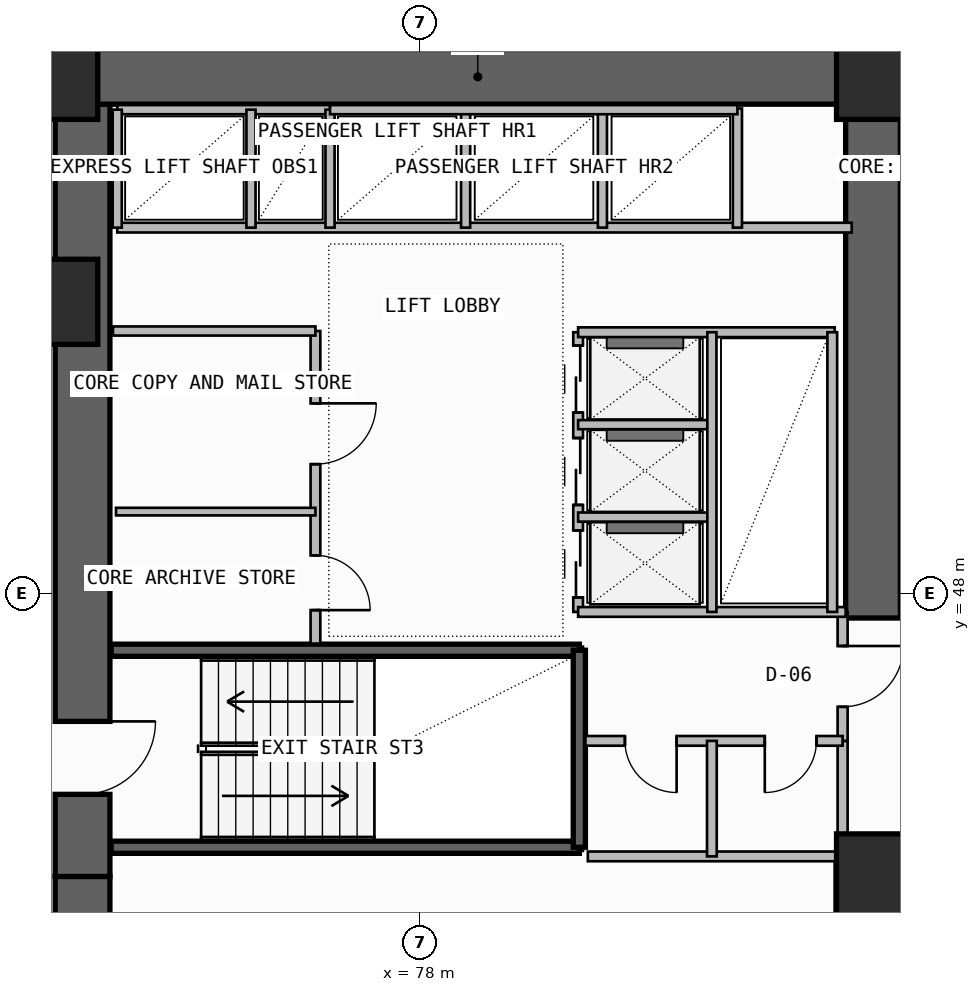
"""IFC4 building model, lengths in metres.
Left out: names, types, materials, properties, quantities, classifications, styles, units other than length and angle.
Written with IfcOpenShell. Run it as: python <this file> out.ifc"""

import sys

from ifc_helpers import new_model, si_unit, direction, frame, frame_2d, origin, origin_2d, place, context, subcontext, project, spatial, rectangle, extrude, element, fill, save


model = new_model("IFC4")
c1 = context("Model", 3, precision=1e-05, world=origin(), true_north=direction((0.0, 1.0)))
c2 = subcontext(c1, "Body", "Model", "MODEL_VIEW")
j1 = project(units=[si_unit("LENGTHUNIT", "METRE"), si_unit("PLANEANGLEUNIT", "RADIAN")], contexts=[c1])
p1 = place(None, origin())
s1 = spatial("IfcSite", under=j1, at=p1, CompositionType="ELEMENT")
p2 = place(p1, origin())
s2 = spatial("IfcBuilding", under=s1, at=p2, CompositionType="ELEMENT")
p3 = place(p2, frame((0.0, 0.0, 153.9)))
s3 = spatial("IfcBuildingStorey", under=s2, at=p3, CompositionType="ELEMENT", Elevation=153.9)
p4 = place(p3, frame((72.45, 35.5, -0.26), z_axis=(0.0, 0.0, 1.0), x_axis=(0.0, 1.0, 0.0)))
e1 = element("IfcWall", 1, at=p4, inside=s3, PredefinedType="SHEAR", context=c2, shape_type="SweptSolid", body=[
    extrude(rectangle(XDim=7.85, YDim=0.9, at=frame_2d((3.925, 0.0))), origin(), (0.0, 0.0, 1.0), 3.6),
])
p5 = place(p4, frame((1.45, 0.0, 0.26)))
e2 = element("IfcOpeningElement", 2, at=p5, cuts=e1, PredefinedType="OPENING", context=c2, shape_type="SweptSolid", body=[
    extrude(rectangle(XDim=1.2, YDim=2.2, at=frame_2d((0.6, 1.1))), frame((0.0, 0.46, 0.0), z_axis=(0.0, -1.0, 0.0), x_axis=(1.0, 0.0, 0.0)), (0.0, 0.0, 1.0), 0.92),
])
p6 = place(p3, frame((72.45, 43.35, -0.26), z_axis=(0.0, 0.0, 1.0), x_axis=(0.0, 1.0, 0.0)))
e3 = element("IfcWall", 3, at=p6, inside=s3, PredefinedType="SHEAR", context=c2, shape_type="SweptSolid", body=[
    extrude(rectangle(XDim=12.7, YDim=0.9, at=frame_2d((6.35, 0.0))), origin(), (0.0, 0.0, 1.0), 3.6),
])
p7 = place(p6, frame((1.35, 0.0, 0.26)))
e4 = element("IfcOpeningElement", 4, at=p7, cuts=e3, PredefinedType="OPENING", context=c2, shape_type="SweptSolid", body=[
    extrude(rectangle(XDim=1.2, YDim=2.2, at=frame_2d((0.6, 1.1))), frame((0.0, 0.46, 0.0), z_axis=(0.0, -1.0, 0.0), x_axis=(1.0, 0.0, 0.0)), (0.0, 0.0, 1.0), 0.92),
])
p8 = place(p3, frame((72.0, 56.5, -0.26), z_axis=(0.0, 0.0, 1.0), x_axis=(1.0, 0.0, 0.0)))
e5 = element("IfcWall", 5, at=p8, inside=s3, PredefinedType="SHEAR", context=c2, shape_type="SweptSolid", body=[
    extrude(rectangle(XDim=13.9, YDim=0.9, at=frame_2d((6.95, 0.0))), origin(), (0.0, 0.0, 1.0), 3.6),
])
p9 = place(p3, frame((85.45, 47.6, -0.26), z_axis=(0.0, 0.0, 1.0), x_axis=(0.0, 1.0, 0.0)))
e6 = element("IfcWall", 6, at=p9, inside=s3, PredefinedType="SHEAR", context=c2, shape_type="SweptSolid", body=[
    extrude(rectangle(XDim=8.45, YDim=0.9, at=frame_2d((4.225, 0.0))), origin(), (0.0, 0.0, 1.0), 3.6),
])
for number, where, z_axis, x_axis in (
    (7, (85.55, 43.35, 0.0), (0.0, 0.0, 1.0), (1.0, 0.0, 0.0)),
    (8, (72.0, 52.8, 0.0), (0.0, 0.0, 1.0), (1.0, 0.0, 0.0)),
    (9, (72.0, 56.5, 0.0), (0.0, 0.0, 1.0), (1.0, 0.0, 0.0)),
    (10, (85.55, 56.5, 0.0), (0.0, 0.0, 1.0), (1.0, 0.0, 0.0)),
):
    element("IfcColumn", number, at=place(p3, frame(where, z_axis=z_axis, x_axis=x_axis)), inside=s3, PredefinedType="COLUMN", context=c2, shape_type="SweptSolid", body=[
        extrude(rectangle(XDim=1.4, YDim=1.4, at=origin_2d()), origin(), (0.0, 0.0, 1.0), 3.6),
    ])
p10 = place(p3, frame((84.92, 38.85, 0.0), z_axis=(0.0, 0.0, 1.0), x_axis=(0.0, 1.0, 0.0)))
e11 = element("IfcWall", 11, at=p10, inside=s3, PredefinedType="SOLIDWALL", context=c2, shape_type="SweptSolid", body=[
    extrude(rectangle(XDim=4.83, YDim=0.2, at=frame_2d((2.415, 0.0))), origin(), (0.0, 0.0, 1.0), 3.34),
])
p11 = place(p10, frame((1.25, 0.0, 0.0)))
e12 = element("IfcOpeningElement", 12, at=p11, cuts=e11, PredefinedType="OPENING", context=c2, shape_type="SweptSolid", body=[
    extrude(rectangle(XDim=1.1, YDim=2.2, at=frame_2d((0.55, 1.1))), frame((0.0, 0.11, 0.0), z_axis=(0.0, -1.0, 0.0), x_axis=(1.0, 0.0, 0.0)), (0.0, 0.0, 1.0), 0.22),
])
for number, where, z_axis, x_axis in (
    (13, (72.92, 43.83, -0.26), (0.0, 0.0, 1.0), (1.0, 0.0, 0.0)),
    (14, (72.92, 47.07, -0.26), (0.0, 0.0, 1.0), (1.0, 0.0, 0.0)),
):
    element("IfcWall", number, at=place(p3, frame(where, z_axis=z_axis, x_axis=x_axis)), inside=s3, PredefinedType="SOLIDWALL", context=c2, shape_type="SweptSolid", body=[
        extrude(rectangle(XDim=7.7, YDim=0.2, at=frame_2d((3.85, 0.0))), origin(), (0.0, 0.0, 1.0), 3.6),
    ])
p12 = place(p3, frame((80.62, 43.83, -0.26), z_axis=(0.0, 0.0, 1.0), x_axis=(0.0, 1.0, 0.0)))
e15 = element("IfcWall", 15, at=p12, inside=s3, PredefinedType="SOLIDWALL", context=c2, shape_type="SweptSolid", body=[
    extrude(rectangle(XDim=3.24, YDim=0.2, at=frame_2d((1.62, 0.0))), origin(), (0.0, 0.0, 1.0), 3.6),
])
p13 = place(p3, frame((84.95, 43.68, 0.0), z_axis=(0.0, 0.0, 1.0), x_axis=(0.0, 1.0, 0.0)))
e16 = element("IfcWall", 16, at=p13, inside=s3, PredefinedType="PLUMBINGWALL", context=c2, shape_type="SweptSolid", body=[
    extrude(rectangle(XDim=1.9, YDim=0.165, at=frame_2d((0.95, 0.0))), origin(), (0.0, 0.0, 1.0), 3.34),
])
p14 = place(p3, frame((84.95, 45.58, 0.0), z_axis=(0.0, 0.0, 1.0), x_axis=(0.0, 1.0, 0.0)))
e17 = element("IfcWall", 17, at=p14, inside=s3, PredefinedType="PARTITIONING", context=c2, shape_type="SweptSolid", body=[
    extrude(rectangle(XDim=2.12, YDim=0.165, at=frame_2d((1.06, 0.0))), origin(), (0.0, 0.0, 1.0), 3.34),
])
p15 = place(p14, frame((0.56, 0.0, 0.0)))
e18 = element("IfcOpeningElement", 18, at=p15, cuts=e17, PredefinedType="OPENING", context=c2, shape_type="SweptSolid", body=[
    extrude(rectangle(XDim=1.0, YDim=2.2, at=frame_2d((0.5, 1.1))), frame((0.0, 0.093, 0.0), z_axis=(0.0, -1.0, 0.0), x_axis=(1.0, 0.0, 0.0)), (0.0, 0.0, 1.0), 0.185),
])
p16 = place(p3, frame((80.72, 45.58, 0.0), z_axis=(0.0, 0.0, 1.0), x_axis=(1.0, 0.0, 0.0)))
e19 = element("IfcWall", 19, at=p16, inside=s3, PredefinedType="PLUMBINGWALL", context=c2, shape_type="SweptSolid", body=[
    extrude(rectangle(XDim=4.23, YDim=0.16, at=frame_2d((2.115, 0.0))), origin(), (0.0, 0.0, 1.0), 3.34),
])
p17 = place(p16, frame((0.65, 0.0, 0.0)))
e20 = element("IfcOpeningElement", 20, at=p17, cuts=e19, PredefinedType="OPENING", context=c2, shape_type="SweptSolid", body=[
    extrude(rectangle(XDim=0.85, YDim=2.05, at=frame_2d((0.425, 1.025))), frame((0.0, 0.09, 0.0), z_axis=(0.0, -1.0, 0.0), x_axis=(1.0, 0.0, 0.0)), (0.0, 0.0, 1.0), 0.18),
])
p18 = place(p16, frame((2.95, 0.0, 0.0)))
e21 = element("IfcOpeningElement", 21, at=p18, cuts=e19, PredefinedType="OPENING", context=c2, shape_type="SweptSolid", body=[
    extrude(rectangle(XDim=0.85, YDim=2.05, at=frame_2d((0.425, 1.025))), frame((0.0, 0.09, 0.0), z_axis=(0.0, -1.0, 0.0), x_axis=(1.0, 0.0, 0.0)), (0.0, 0.0, 1.0), 0.18),
])
p19 = place(p3, frame((80.76, 43.68, 0.0), z_axis=(0.0, 0.0, 1.0), x_axis=(1.0, 0.0, 0.0)))
e22 = element("IfcWall", 22, at=p19, inside=s3, PredefinedType="PLUMBINGWALL", context=c2, shape_type="SweptSolid", body=[
    extrude(rectangle(XDim=4.19, YDim=0.16, at=frame_2d((2.095, 0.0))), origin(), (0.0, 0.0, 1.0), 3.34),
])
p20 = place(p3, frame((82.8, 43.68, 0.0), z_axis=(0.0, 0.0, 1.0), x_axis=(0.0, 1.0, 0.0)))
e23 = element("IfcWall", 23, at=p20, inside=s3, PredefinedType="PLUMBINGWALL", context=c2, shape_type="SweptSolid", body=[
    extrude(rectangle(XDim=1.9, YDim=0.16, at=frame_2d((0.95, 0.0))), origin(), (0.0, 0.0, 1.0), 3.34),
])
p21 = place(p3, frame((76.28, 47.18, 0.0), z_axis=(0.0, 0.0, 1.0), x_axis=(0.0, 1.0, 0.0)))
e24 = element("IfcWall", 24, at=p21, inside=s3, PredefinedType="SOLIDWALL", context=c2, shape_type="SweptSolid", body=[
    extrude(rectangle(XDim=5.14, YDim=0.16, at=frame_2d((2.57, 0.0))), origin(), (0.0, 0.0, 1.0), 3.34),
])
p22 = place(p21, frame((0.55, 0.0, 0.0)))
e25 = element("IfcOpeningElement", 25, at=p22, cuts=e24, PredefinedType="OPENING", context=c2, shape_type="SweptSolid", body=[
    extrude(rectangle(XDim=0.9, YDim=2.1, at=frame_2d((0.45, 1.05))), frame((0.0, 0.09, 0.0), z_axis=(0.0, -1.0, 0.0), x_axis=(1.0, 0.0, 0.0)), (0.0, 0.0, 1.0), 0.18),
])
p23 = place(p21, frame((2.95, 0.0, 0.0)))
e26 = element("IfcOpeningElement", 26, at=p23, cuts=e24, PredefinedType="OPENING", context=c2, shape_type="SweptSolid", body=[
    extrude(rectangle(XDim=1.0, YDim=2.2, at=frame_2d((0.5, 1.1))), frame((0.0, 0.09, 0.0), z_axis=(0.0, -1.0, 0.0), x_axis=(1.0, 0.0, 0.0)), (0.0, 0.0, 1.0), 0.18),
])
p24 = place(p3, frame((72.95, 52.32, 0.0), z_axis=(0.0, 0.0, 1.0), x_axis=(1.0, 0.0, 0.0)))
e27 = element("IfcWall", 27, at=p24, inside=s3, PredefinedType="SOLIDWALL", context=c2, shape_type="SweptSolid", body=[
    extrude(rectangle(XDim=3.33, YDim=0.15, at=frame_2d((1.665, 0.0))), origin(), (0.0, 0.0, 1.0), 3.34),
])
p25 = place(p3, frame((73.0, 49.35, 0.0), z_axis=(0.0, 0.0, 1.0), x_axis=(1.0, 0.0, 0.0)))
e28 = element("IfcWall", 28, at=p25, inside=s3, PredefinedType="PARTITIONING", context=c2, shape_type="SweptSolid", body=[
    extrude(rectangle(XDim=3.28, YDim=0.125, at=frame_2d((1.64, 0.0))), origin(), (0.0, 0.0, 1.0), 3.34),
])
p26 = place(p3, frame((80.6, 47.7, 0.0), z_axis=(0.0, 0.0, 1.0), x_axis=(0.0, 1.0, 0.0)))
e29 = element("IfcWall", 29, at=p26, inside=s3, PredefinedType="SOLIDWALL", context=c2, shape_type="SweptSolid", body=[
    extrude(rectangle(XDim=4.6, YDim=0.16, at=frame_2d((2.3, 0.0))), origin(), (0.0, 0.0, 1.0), 3.34),
])
p27 = place(p26, frame((0.24, 0.0, 0.0)))
e30 = element("IfcOpeningElement", 30, at=p27, cuts=e29, PredefinedType="OPENING", context=c2, shape_type="SweptSolid", body=[
    extrude(rectangle(XDim=1.1, YDim=2.25, at=frame_2d((0.55, 1.125))), frame((0.0, 0.09, 0.0), z_axis=(0.0, -1.0, 0.0), x_axis=(1.0, 0.0, 0.0)), (0.0, 0.0, 1.0), 0.18),
])
p28 = place(p26, frame((1.76, 0.0, 0.0)))
e31 = element("IfcOpeningElement", 31, at=p28, cuts=e29, PredefinedType="OPENING", context=c2, shape_type="SweptSolid", body=[
    extrude(rectangle(XDim=1.1, YDim=2.25, at=frame_2d((0.55, 1.125))), frame((0.0, 0.09, 0.0), z_axis=(0.0, -1.0, 0.0), x_axis=(1.0, 0.0, 0.0)), (0.0, 0.0, 1.0), 0.18),
])
p29 = place(p26, frame((3.28, 0.0, 0.0)))
e32 = element("IfcOpeningElement", 32, at=p29, cuts=e29, PredefinedType="OPENING", context=c2, shape_type="SweptSolid", body=[
    extrude(rectangle(XDim=1.1, YDim=2.25, at=frame_2d((0.55, 1.125))), frame((0.0, 0.09, 0.0), z_axis=(0.0, -1.0, 0.0), x_axis=(1.0, 0.0, 0.0)), (0.0, 0.0, 1.0), 0.18),
])
p30 = place(p3, frame((80.6, 47.7, 0.0), z_axis=(0.0, 0.0, 1.0), x_axis=(1.0, 0.0, 0.0)))
e33 = element("IfcWall", 33, at=p30, inside=s3, PredefinedType="SOLIDWALL", context=c2, shape_type="SweptSolid", body=[
    extrude(rectangle(XDim=4.4, YDim=0.16, at=frame_2d((2.2, 0.0))), origin(), (0.0, 0.0, 1.0), 3.34),
])
p31 = place(p3, frame((80.6, 52.3, 0.0), z_axis=(0.0, 0.0, 1.0), x_axis=(1.0, 0.0, 0.0)))
e34 = element("IfcWall", 34, at=p31, inside=s3, PredefinedType="SOLIDWALL", context=c2, shape_type="SweptSolid", body=[
    extrude(rectangle(XDim=4.22, YDim=0.16, at=frame_2d((2.11, 0.0))), origin(), (0.0, 0.0, 1.0), 3.34),
])
for number, where, z_axis, x_axis in (
    (35, (80.6, 49.26, 0.0), (0.0, 0.0, 1.0), (1.0, 0.0, 0.0)),
    (36, (80.6, 50.78, 0.0), (0.0, 0.0, 1.0), (1.0, 0.0, 0.0)),
):
    element("IfcWall", number, at=place(p3, frame(where, z_axis=z_axis, x_axis=x_axis)), inside=s3, PredefinedType="PLUMBINGWALL", context=c2, shape_type="SweptSolid", body=[
        extrude(rectangle(XDim=2.2, YDim=0.15, at=frame_2d((1.1, 0.0))), origin(), (0.0, 0.0, 1.0), 3.34),
    ])
p32 = place(p3, frame((82.8, 47.7, 0.0), z_axis=(0.0, 0.0, 1.0), x_axis=(0.0, 1.0, 0.0)))
e37 = element("IfcWall", 37, at=p32, inside=s3, PredefinedType="PLUMBINGWALL", context=c2, shape_type="SweptSolid", body=[
    extrude(rectangle(XDim=4.6, YDim=0.15, at=frame_2d((2.3, 0.0))), origin(), (0.0, 0.0, 1.0), 3.34),
])
p33 = place(p3, frame((84.78, 47.7, 0.0), z_axis=(0.0, 0.0, 1.0), x_axis=(0.0, 1.0, 0.0)))
e38 = element("IfcWall", 38, at=p33, inside=s3, PredefinedType="SOLIDWALL", context=c2, shape_type="SweptSolid", body=[
    extrude(rectangle(XDim=4.6, YDim=0.16, at=frame_2d((2.3, 0.0))), origin(), (0.0, 0.0, 1.0), 3.34),
])
p34 = place(p3, frame((73.02, 54.02, 0.0), z_axis=(0.0, 0.0, 1.0), x_axis=(1.0, 0.0, 0.0)))
e39 = element("IfcWall", 39, at=p34, inside=s3, PredefinedType="SOLIDWALL", context=c2, shape_type="SweptSolid", body=[
    extrude(rectangle(XDim=12.08, YDim=0.16, at=frame_2d((6.04, 0.0))), origin(), (0.0, 0.0, 1.0), 3.34),
])
p35 = place(p3, frame((73.02, 55.96, 0.0), z_axis=(0.0, 0.0, 1.0), x_axis=(1.0, 0.0, 0.0)))
e40 = element("IfcWall", 40, at=p35, inside=s3, PredefinedType="SOLIDWALL", context=c2, shape_type="SweptSolid", body=[
    extrude(rectangle(XDim=3.5, YDim=0.15, at=frame_2d((1.75, 0.0))), origin(), (0.0, 0.0, 1.0), 3.34),
])
p36 = place(p3, frame((73.02, 54.02, 0.0), z_axis=(0.0, 0.0, 1.0), x_axis=(0.0, 1.0, 0.0)))
e41 = element("IfcWall", 41, at=p36, inside=s3, PredefinedType="PLUMBINGWALL", context=c2, shape_type="SweptSolid", body=[
    extrude(rectangle(XDim=1.94, YDim=0.15, at=frame_2d((0.97, 0.0))), origin(), (0.0, 0.0, 1.0), 3.34),
])
p37 = place(p3, frame((76.52, 54.02, 0.0), z_axis=(0.0, 0.0, 1.0), x_axis=(0.0, 1.0, 0.0)))
e42 = element("IfcWall", 42, at=p37, inside=s3, PredefinedType="SOLIDWALL", context=c2, shape_type="SweptSolid", body=[
    extrude(rectangle(XDim=1.94, YDim=0.15, at=frame_2d((0.97, 0.0))), origin(), (0.0, 0.0, 1.0), 3.34),
])
p38 = place(p3, frame((75.22, 54.02, 0.0), z_axis=(0.0, 0.0, 1.0), x_axis=(0.0, 1.0, 0.0)))
e43 = element("IfcWall", 43, at=p38, inside=s3, PredefinedType="PLUMBINGWALL", context=c2, shape_type="SweptSolid", body=[
    extrude(rectangle(XDim=1.94, YDim=0.15, at=frame_2d((0.97, 0.0))), origin(), (0.0, 0.0, 1.0), 3.34),
])
for number, where, z_axis, x_axis in (
    (44, (78.75, 54.02, 0.0), (0.0, 0.0, 1.0), (0.0, 1.0, 0.0)),
    (45, (81.0, 54.02, 0.0), (0.0, 0.0, 1.0), (0.0, 1.0, 0.0)),
):
    element("IfcWall", number, at=place(p3, frame(where, z_axis=z_axis, x_axis=x_axis)), inside=s3, PredefinedType="PLUMBINGWALL", context=c2, shape_type="SweptSolid", body=[
        extrude(rectangle(XDim=1.96, YDim=0.15, at=frame_2d((0.98, 0.0))), origin(), (0.0, 0.0, 1.0), 3.34),
    ])
p39 = place(p3, frame((83.22, 54.02, 0.0), z_axis=(0.0, 0.0, 1.0), x_axis=(0.0, 1.0, 0.0)))
e46 = element("IfcWall", 46, at=p39, inside=s3, PredefinedType="SOLIDWALL", context=c2, shape_type="SweptSolid", body=[
    extrude(rectangle(XDim=1.96, YDim=0.15, at=frame_2d((0.98, 0.0))), origin(), (0.0, 0.0, 1.0), 3.34),
])
p40 = place(p3, frame((76.52, 55.96, 0.0), z_axis=(0.0, 0.0, 1.0), x_axis=(1.0, 0.0, 0.0)))
e47 = element("IfcWall", 47, at=p40, inside=s3, PredefinedType="SOLIDWALL", context=c2, shape_type="SweptSolid", body=[
    extrude(rectangle(XDim=6.7, YDim=0.15, at=frame_2d((3.35, 0.0))), origin(), (0.0, 0.0, 1.0), 3.34),
])
p41 = place(p7, frame((1.2, 0.0, 0.0), z_axis=(0.0, 0.0, 1.0), x_axis=(-1.0, 0.0, 0.0)))
e48 = element("IfcDoor", 48, at=p41, inside=s3, OperationType="SINGLE_SWING_LEFT", PredefinedType="USERDEFINED", context=c2, shape_type="SweptSolid", body=[
    extrude(rectangle(XDim=1.2, YDim=2.2, at=frame_2d((0.6, 1.1))), frame((0.0, 0.025, 0.0), z_axis=(0.0, -1.0, 0.0), x_axis=(1.0, 0.0, 0.0)), (0.0, 0.0, 1.0), 0.05),
])
fill(e4, e48)
p42 = place(p15, frame((1.0, 0.0, 0.0), z_axis=(0.0, 0.0, 1.0), x_axis=(-1.0, 0.0, 0.0)))
e49 = element("IfcDoor", 49, at=p42, inside=s3, OperationType="SINGLE_SWING_LEFT", PredefinedType="DOOR", context=c2, shape_type="SweptSolid", body=[
    extrude(rectangle(XDim=1.0, YDim=2.2, at=frame_2d((0.5, 1.1))), frame((0.0, 0.025, 0.0), z_axis=(0.0, -1.0, 0.0), x_axis=(1.0, 0.0, 0.0)), (0.0, 0.0, 1.0), 0.05),
])
fill(e18, e49)
p43 = place(p17, frame((0.85, 0.0, 0.0), z_axis=(0.0, 0.0, 1.0), x_axis=(-1.0, 0.0, 0.0)))
e50 = element("IfcDoor", 50, at=p43, inside=s3, OperationType="SINGLE_SWING_LEFT", PredefinedType="DOOR", context=c2, shape_type="SweptSolid", body=[
    extrude(rectangle(XDim=0.85, YDim=2.05, at=frame_2d((0.425, 1.025))), frame((0.0, 0.025, 0.0), z_axis=(0.0, -1.0, 0.0), x_axis=(1.0, 0.0, 0.0)), (0.0, 0.0, 1.0), 0.05),
])
fill(e20, e50)
p44 = place(p18, frame((0.85, 0.0, 0.0), z_axis=(0.0, 0.0, 1.0), x_axis=(-1.0, 0.0, 0.0)))
e51 = element("IfcDoor", 51, at=p44, inside=s3, OperationType="SINGLE_SWING_RIGHT", PredefinedType="DOOR", context=c2, shape_type="SweptSolid", body=[
    extrude(rectangle(XDim=0.85, YDim=2.05, at=frame_2d((0.425, 1.025))), frame((0.0, 0.025, 0.0), z_axis=(0.0, -1.0, 0.0), x_axis=(1.0, 0.0, 0.0)), (0.0, 0.0, 1.0), 0.05),
])
fill(e21, e51)
p45 = place(p22, frame((0.9, 0.0, 0.0), z_axis=(0.0, 0.0, 1.0), x_axis=(-1.0, 0.0, 0.0)))
e52 = element("IfcDoor", 52, at=p45, inside=s3, OperationType="SINGLE_SWING_RIGHT", PredefinedType="DOOR", context=c2, shape_type="SweptSolid", body=[
    extrude(rectangle(XDim=0.9, YDim=2.1, at=frame_2d((0.45, 1.05))), frame((0.0, 0.025, 0.0), z_axis=(0.0, -1.0, 0.0), x_axis=(1.0, 0.0, 0.0)), (0.0, 0.0, 1.0), 0.05),
])
fill(e25, e52)
p46 = place(p23, frame((1.0, 0.0, 0.0), z_axis=(0.0, 0.0, 1.0), x_axis=(-1.0, 0.0, 0.0)))
e53 = element("IfcDoor", 53, at=p46, inside=s3, OperationType="SINGLE_SWING_LEFT", PredefinedType="DOOR", context=c2, shape_type="SweptSolid", body=[
    extrude(rectangle(XDim=1.0, YDim=2.2, at=frame_2d((0.5, 1.1))), frame((0.0, 0.025, 0.0), z_axis=(0.0, -1.0, 0.0), x_axis=(1.0, 0.0, 0.0)), (0.0, 0.0, 1.0), 0.05),
])
fill(e26, e53)
p47 = place(p27, frame((1.1, 0.0, 0.0), z_axis=(0.0, 0.0, 1.0), x_axis=(-1.0, 0.0, 0.0)))
e54 = element("IfcDoor", 54, at=p47, inside=s3, OperationType="DOUBLE_DOOR_SLIDING", PredefinedType="DOOR", context=c2, shape_type="SweptSolid", body=[
    extrude(rectangle(XDim=1.1, YDim=2.25, at=frame_2d((0.55, 1.125))), frame((0.0, 0.025, 0.0), z_axis=(0.0, -1.0, 0.0), x_axis=(1.0, 0.0, 0.0)), (0.0, 0.0, 1.0), 0.05),
])
fill(e30, e54)
p48 = place(p28, frame((1.1, 0.0, 0.0), z_axis=(0.0, 0.0, 1.0), x_axis=(-1.0, 0.0, 0.0)))
e55 = element("IfcDoor", 55, at=p48, inside=s3, OperationType="DOUBLE_DOOR_SLIDING", PredefinedType="DOOR", context=c2, shape_type="SweptSolid", body=[
    extrude(rectangle(XDim=1.1, YDim=2.25, at=frame_2d((0.55, 1.125))), frame((0.0, 0.025, 0.0), z_axis=(0.0, -1.0, 0.0), x_axis=(1.0, 0.0, 0.0)), (0.0, 0.0, 1.0), 0.05),
])
fill(e31, e55)
p49 = place(p29, frame((1.1, 0.0, 0.0), z_axis=(0.0, 0.0, 1.0), x_axis=(-1.0, 0.0, 0.0)))
e56 = element("IfcDoor", 56, at=p49, inside=s3, OperationType="DOUBLE_DOOR_SLIDING", PredefinedType="DOOR", context=c2, shape_type="SweptSolid", body=[
    extrude(rectangle(XDim=1.1, YDim=2.25, at=frame_2d((0.55, 1.125))), frame((0.0, 0.025, 0.0), z_axis=(0.0, -1.0, 0.0), x_axis=(1.0, 0.0, 0.0)), (0.0, 0.0, 1.0), 0.05),
])
fill(e32, e56)
save(model, sys.argv[1])
